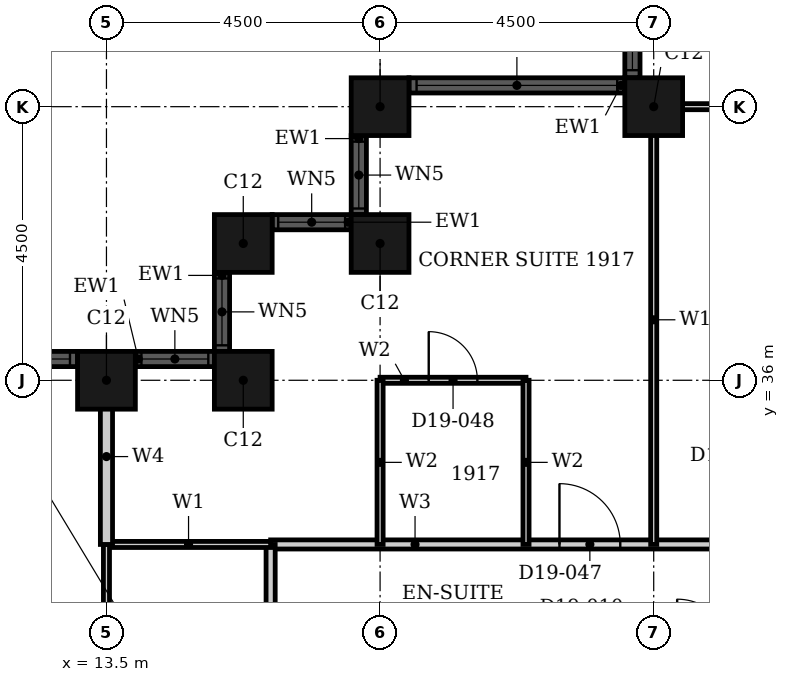
"""IFC4 building model, lengths in metres.
Left out: names, types, materials, properties, quantities, classifications, styles, units other than length and angle.
Written with IfcOpenShell. Run it as: python <this file> out.ifc"""

import sys

from ifc_helpers import new_model, si_unit, direction, frame, frame_2d, origin, origin_2d, place, context, subcontext, project, spatial, rectangle, hollow_rectangle, extrude, element, fill, save


model = new_model("IFC4")
c1 = context("Model", 3, precision=1e-05, world=origin(), true_north=direction((0.0, 1.0)))
c2 = subcontext(c1, "Body", "Model", "MODEL_VIEW")
j1 = project(units=[si_unit("LENGTHUNIT", "METRE"), si_unit("PLANEANGLEUNIT", "RADIAN")], contexts=[c1])
p1 = place(None, origin())
s1 = spatial("IfcSite", under=j1, at=p1, CompositionType="ELEMENT")
p2 = place(p1, origin())
s2 = spatial("IfcBuilding", under=s1, at=p2, CompositionType="ELEMENT")
p3 = place(p2, frame((0.0, 0.0, 81.6)))
s3 = spatial("IfcBuildingStorey", under=s2, at=p3, CompositionType="ELEMENT", Elevation=81.6)
for number, where, z_axis, x_axis in (
    (1, (22.5, 40.5, 0.0), (0.0, 0.0, 1.0), (1.0, 0.0, 0.0)),
    (2, (18.0, 40.5, 0.0), (0.0, 0.0, 1.0), (1.0, 0.0, 0.0)),
    (3, (18.0, 38.25, 0.0), (0.0, 0.0, 1.0), (1.0, 0.0, 0.0)),
    (4, (15.75, 38.25, 0.0), (0.0, 0.0, 1.0), (1.0, 0.0, 0.0)),
    (5, (15.75, 36.0, 0.0), (0.0, 0.0, 1.0), (1.0, 0.0, 0.0)),
    (6, (13.5, 36.0, 0.0), (0.0, 0.0, 1.0), (1.0, 0.0, 0.0)),
):
    element("IfcColumn", number, at=place(p3, frame(where, z_axis=z_axis, x_axis=x_axis)), inside=s3, PredefinedType="COLUMN", context=c2, shape_type="SweptSolid", body=[
        extrude(hollow_rectangle(XDim=0.95, YDim=0.95, WallThickness=0.03, at=origin_2d()), origin(), (0.0, 0.0, 1.0), 3.6),
    ])
p4 = place(p3, frame((22.15, 49.025, 0.0), z_axis=(0.0, 0.0, 1.0), x_axis=(0.0, -1.0, 0.0)))
e7 = element("IfcWall", 7, at=p4, inside=s3, PredefinedType="SOLIDWALL", context=c2, shape_type="SweptSolid", body=[
    extrude(rectangle(XDim=8.05, YDim=0.25, at=frame_2d((4.025, 0.0))), origin(), (0.0, 0.0, 1.0), 3.6),
])
p5 = place(p4, frame((0.125, 0.0, 0.9)))
e8 = element("IfcOpeningElement", 8, at=p5, cuts=e7, PredefinedType="OPENING", context=c2, shape_type="SweptSolid", body=[
    extrude(rectangle(XDim=3.3, YDim=2.08, at=frame_2d((1.65, 1.04))), frame((0.0, 0.135, 0.0), z_axis=(0.0, -1.0, 0.0), x_axis=(1.0, 0.0, 0.0)), (0.0, 0.0, 1.0), 0.27),
])
p6 = place(p4, frame((4.625, 0.0, 0.9)))
e9 = element("IfcOpeningElement", 9, at=p6, cuts=e7, PredefinedType="OPENING", context=c2, shape_type="SweptSolid", body=[
    extrude(rectangle(XDim=3.3, YDim=2.08, at=frame_2d((1.65, 1.04))), frame((0.0, 0.135, 0.0), z_axis=(0.0, -1.0, 0.0), x_axis=(1.0, 0.0, 0.0)), (0.0, 0.0, 1.0), 0.27),
])
p7 = place(p3, frame((22.025, 40.85, 0.0), z_axis=(0.0, 0.0, 1.0), x_axis=(-1.0, 0.0, 0.0)))
e10 = element("IfcWall", 10, at=p7, inside=s3, PredefinedType="SOLIDWALL", context=c2, shape_type="SweptSolid", body=[
    extrude(rectangle(XDim=3.55, YDim=0.25, at=frame_2d((1.775, 0.0))), origin(), (0.0, 0.0, 1.0), 3.6),
])
p8 = place(p7, frame((0.125, 0.0, 0.9)))
e11 = element("IfcOpeningElement", 11, at=p8, cuts=e10, PredefinedType="OPENING", context=c2, shape_type="SweptSolid", body=[
    extrude(rectangle(XDim=3.3, YDim=2.08, at=frame_2d((1.65, 1.04))), frame((0.0, 0.135, 0.0), z_axis=(0.0, -1.0, 0.0), x_axis=(1.0, 0.0, 0.0)), (0.0, 0.0, 1.0), 0.27),
])
p9 = place(p3, frame((17.65, 40.025, 0.0), z_axis=(0.0, 0.0, 1.0), x_axis=(0.0, -1.0, 0.0)))
e12 = element("IfcWall", 12, at=p9, inside=s3, PredefinedType="SOLIDWALL", context=c2, shape_type="SweptSolid", body=[
    extrude(rectangle(XDim=1.3, YDim=0.25, at=frame_2d((0.65, 0.0))), origin(), (0.0, 0.0, 1.0), 3.6),
])
p10 = place(p9, frame((0.1, 0.0, 0.9)))
e13 = element("IfcOpeningElement", 13, at=p10, cuts=e12, PredefinedType="OPENING", context=c2, shape_type="SweptSolid", body=[
    extrude(rectangle(XDim=1.1, YDim=2.08, at=frame_2d((0.55, 1.04))), frame((0.0, 0.135, 0.0), z_axis=(0.0, -1.0, 0.0), x_axis=(1.0, 0.0, 0.0)), (0.0, 0.0, 1.0), 0.27),
])
p11 = place(p3, frame((17.525, 38.6, 0.0), z_axis=(0.0, 0.0, 1.0), x_axis=(-1.0, 0.0, 0.0)))
e14 = element("IfcWall", 14, at=p11, inside=s3, PredefinedType="SOLIDWALL", context=c2, shape_type="SweptSolid", body=[
    extrude(rectangle(XDim=1.3, YDim=0.25, at=frame_2d((0.65, 0.0))), origin(), (0.0, 0.0, 1.0), 3.6),
])
p12 = place(p11, frame((0.1, 0.0, 0.9)))
e15 = element("IfcOpeningElement", 15, at=p12, cuts=e14, PredefinedType="OPENING", context=c2, shape_type="SweptSolid", body=[
    extrude(rectangle(XDim=1.1, YDim=2.08, at=frame_2d((0.55, 1.04))), frame((0.0, 0.135, 0.0), z_axis=(0.0, -1.0, 0.0), x_axis=(1.0, 0.0, 0.0)), (0.0, 0.0, 1.0), 0.27),
])
p13 = place(p3, frame((15.4, 37.775, 0.0), z_axis=(0.0, 0.0, 1.0), x_axis=(0.0, -1.0, 0.0)))
e16 = element("IfcWall", 16, at=p13, inside=s3, PredefinedType="SOLIDWALL", context=c2, shape_type="SweptSolid", body=[
    extrude(rectangle(XDim=1.3, YDim=0.25, at=frame_2d((0.65, 0.0))), origin(), (0.0, 0.0, 1.0), 3.6),
])
p14 = place(p13, frame((0.1, 0.0, 0.9)))
e17 = element("IfcOpeningElement", 17, at=p14, cuts=e16, PredefinedType="OPENING", context=c2, shape_type="SweptSolid", body=[
    extrude(rectangle(XDim=1.1, YDim=2.08, at=frame_2d((0.55, 1.04))), frame((0.0, 0.135, 0.0), z_axis=(0.0, -1.0, 0.0), x_axis=(1.0, 0.0, 0.0)), (0.0, 0.0, 1.0), 0.27),
])
p15 = place(p3, frame((15.275, 36.35, 0.0), z_axis=(0.0, 0.0, 1.0), x_axis=(-1.0, 0.0, 0.0)))
e18 = element("IfcWall", 18, at=p15, inside=s3, PredefinedType="SOLIDWALL", context=c2, shape_type="SweptSolid", body=[
    extrude(rectangle(XDim=1.3, YDim=0.25, at=frame_2d((0.65, 0.0))), origin(), (0.0, 0.0, 1.0), 3.6),
])
p16 = place(p15, frame((0.1, 0.0, 0.9)))
e19 = element("IfcOpeningElement", 19, at=p16, cuts=e18, PredefinedType="OPENING", context=c2, shape_type="SweptSolid", body=[
    extrude(rectangle(XDim=1.1, YDim=2.08, at=frame_2d((0.55, 1.04))), frame((0.0, 0.135, 0.0), z_axis=(0.0, -1.0, 0.0), x_axis=(1.0, 0.0, 0.0)), (0.0, 0.0, 1.0), 0.27),
])
p17 = place(p3, frame((13.025, 36.35, 0.0), z_axis=(0.0, 0.0, 1.0), x_axis=(-1.0, 0.0, 0.0)))
e20 = element("IfcWall", 20, at=p17, inside=s3, PredefinedType="SOLIDWALL", context=c2, shape_type="SweptSolid", body=[
    extrude(rectangle(XDim=8.05, YDim=0.25, at=frame_2d((4.025, 0.0))), origin(), (0.0, 0.0, 1.0), 3.6),
])
p18 = place(p17, frame((0.125, 0.0, 0.9)))
e21 = element("IfcOpeningElement", 21, at=p18, cuts=e20, PredefinedType="OPENING", context=c2, shape_type="SweptSolid", body=[
    extrude(rectangle(XDim=3.3, YDim=2.08, at=frame_2d((1.65, 1.04))), frame((0.0, 0.135, 0.0), z_axis=(0.0, -1.0, 0.0), x_axis=(1.0, 0.0, 0.0)), (0.0, 0.0, 1.0), 0.27),
])
p19 = place(p17, frame((4.625, 0.0, 0.9)))
e22 = element("IfcOpeningElement", 22, at=p19, cuts=e20, PredefinedType="OPENING", context=c2, shape_type="SweptSolid", body=[
    extrude(rectangle(XDim=3.3, YDim=2.08, at=frame_2d((1.65, 1.04))), frame((0.0, 0.135, 0.0), z_axis=(0.0, -1.0, 0.0), x_axis=(1.0, 0.0, 0.0)), (0.0, 0.0, 1.0), 0.27),
])
p20 = place(p3, frame((16.2, 33.3, 0.0), z_axis=(0.0, 0.0, 1.0), x_axis=(1.0, 0.0, 0.0)))
e23 = element("IfcWall", 23, at=p20, inside=s3, PredefinedType="PARTITIONING", context=c2, shape_type="SweptSolid", body=[
    extrude(rectangle(XDim=15.3, YDim=0.15, at=frame_2d((7.65, 0.0))), origin(), (0.0, 0.0, 1.0), 3.3),
])
p21 = place(p20, frame((4.75, 0.0, 0.0)))
e24 = element("IfcOpeningElement", 24, at=p21, cuts=e23, PredefinedType="OPENING", context=c2, shape_type="SweptSolid", body=[
    extrude(rectangle(XDim=1.0, YDim=2.1, at=frame_2d((0.5, 1.05))), frame((0.0, 0.085, 0.0), z_axis=(0.0, -1.0, 0.0), x_axis=(1.0, 0.0, 0.0)), (0.0, 0.0, 1.0), 0.17),
])
p22 = place(p20, frame((7.65, 0.0, 0.0)))
e25 = element("IfcOpeningElement", 25, at=p22, cuts=e23, PredefinedType="OPENING", context=c2, shape_type="SweptSolid", body=[
    extrude(rectangle(XDim=0.9, YDim=2.1, at=frame_2d((0.45, 1.05))), frame((0.0, 0.085, 0.0), z_axis=(0.0, -1.0, 0.0), x_axis=(1.0, 0.0, 0.0)), (0.0, 0.0, 1.0), 0.17),
])
p23 = place(p20, frame((12.15, 0.0, 0.0)))
e26 = element("IfcOpeningElement", 26, at=p23, cuts=e23, PredefinedType="OPENING", context=c2, shape_type="SweptSolid", body=[
    extrude(rectangle(XDim=0.9, YDim=2.1, at=frame_2d((0.45, 1.05))), frame((0.0, 0.085, 0.0), z_axis=(0.0, -1.0, 0.0), x_axis=(1.0, 0.0, 0.0)), (0.0, 0.0, 1.0), 0.17),
])
p24 = place(p3, frame((16.2, 27.0, 0.0), z_axis=(0.0, 0.0, 1.0), x_axis=(0.0, 1.0, 0.0)))
e27 = element("IfcWall", 27, at=p24, inside=s3, PredefinedType="PARTITIONING", context=c2, shape_type="SweptSolid", body=[
    extrude(rectangle(XDim=6.3, YDim=0.15, at=frame_2d((3.15, 0.0))), origin(), (0.0, 0.0, 1.0), 3.3),
])
p25 = place(p24, frame((2.55, 0.0, 0.0)))
e28 = element("IfcOpeningElement", 28, at=p25, cuts=e27, PredefinedType="OPENING", context=c2, shape_type="SweptSolid", body=[
    extrude(rectangle(XDim=0.9, YDim=2.1, at=frame_2d((0.45, 1.05))), frame((0.0, 0.085, 0.0), z_axis=(0.0, -1.0, 0.0), x_axis=(1.0, 0.0, 0.0)), (0.0, 0.0, 1.0), 0.17),
])
p26 = place(p3, frame((13.5, 33.3, 0.0), z_axis=(0.0, 0.0, 1.0), x_axis=(1.0, 0.0, 0.0)))
e29 = element("IfcWall", 29, at=p26, inside=s3, PredefinedType="PARTITIONING", context=c2, shape_type="SweptSolid", body=[
    extrude(rectangle(XDim=2.7, YDim=0.1, at=frame_2d((1.35, 0.0))), origin(), (0.0, 0.0, 1.0), 3.3),
])
p27 = place(p3, frame((22.31, 40.5, 0.0), z_axis=(0.0, 0.0, 1.0), x_axis=(1.0, 0.0, 0.0)))
e30 = element("IfcWall", 30, at=p27, inside=s3, PredefinedType="PARTITIONING", context=c2, shape_type="SweptSolid", body=[
    extrude(rectangle(XDim=9.19, YDim=0.1, at=frame_2d((4.595, 0.0))), origin(), (0.0, 0.0, 1.0), 2.38),
])
p28 = place(p3, frame((13.5, 27.0, 0.0), z_axis=(0.0, 0.0, 1.0), x_axis=(0.0, 1.0, 0.0)))
e31 = element("IfcWall", 31, at=p28, inside=s3, PredefinedType="PARTITIONING", context=c2, shape_type="SweptSolid", body=[
    extrude(rectangle(XDim=6.3, YDim=0.1, at=frame_2d((3.15, 0.0))), origin(), (0.0, 0.0, 1.0), 2.38),
])
p29 = place(p3, frame((22.5, 33.3, 0.0), z_axis=(0.0, 0.0, 1.0), x_axis=(0.0, 1.0, 0.0)))
e32 = element("IfcWall", 32, at=p29, inside=s3, PredefinedType="PARTITIONING", context=c2, shape_type="SweptSolid", body=[
    extrude(rectangle(XDim=7.39, YDim=0.1, at=frame_2d((3.695, 0.0))), origin(), (0.0, 0.0, 1.0), 3.3),
])
p30 = place(p3, frame((13.5, 33.3, 0.0), z_axis=(0.0, 0.0, 1.0), x_axis=(0.0, 1.0, 0.0)))
e33 = element("IfcWall", 33, at=p30, inside=s3, PredefinedType="PARTITIONING", context=c2, shape_type="SweptSolid", body=[
    extrude(rectangle(XDim=2.89, YDim=0.2, at=frame_2d((1.445, 0.0))), origin(), (0.0, 0.0, 1.0), 2.38),
])
p31 = place(p3, frame((18.0, 36.0, 0.0), z_axis=(0.0, 0.0, 1.0), x_axis=(1.0, 0.0, 0.0)))
e34 = element("IfcWall", 34, at=p31, inside=s3, PredefinedType="PARTITIONING", context=c2, shape_type="SweptSolid", body=[
    extrude(rectangle(XDim=2.4, YDim=0.1, at=frame_2d((1.2, 0.0))), origin(), (0.0, 0.0, 1.0), 3.3),
])
p32 = place(p31, frame((0.8, 0.0, 0.0)))
e35 = element("IfcOpeningElement", 35, at=p32, cuts=e34, PredefinedType="OPENING", context=c2, shape_type="SweptSolid", body=[
    extrude(rectangle(XDim=0.8, YDim=2.1, at=frame_2d((0.4, 1.05))), frame((0.0, 0.06, 0.0), z_axis=(0.0, -1.0, 0.0), x_axis=(1.0, 0.0, 0.0)), (0.0, 0.0, 1.0), 0.12),
])
for number, where, z_axis, x_axis in (
    (36, (18.0, 33.3, 0.0), (0.0, 0.0, 1.0), (0.0, 1.0, 0.0)),
    (37, (20.4, 33.3, 0.0), (0.0, 0.0, 1.0), (0.0, 1.0, 0.0)),
):
    element("IfcWall", number, at=place(p3, frame(where, z_axis=z_axis, x_axis=x_axis)), inside=s3, PredefinedType="PARTITIONING", context=c2, shape_type="SweptSolid", body=[
        extrude(rectangle(XDim=2.7, YDim=0.1, at=frame_2d((1.35, 0.0))), origin(), (0.0, 0.0, 1.0), 3.3),
    ])
p33 = place(p6, origin())
e38 = element("IfcWindow", 38, at=p33, inside=s3, PartitioningType="SINGLE_PANEL", PredefinedType="WINDOW", context=c2, shape_type="SweptSolid", body=[
    extrude(rectangle(XDim=3.3, YDim=2.08, at=frame_2d((1.65, 1.04))), frame((0.0, 0.03, 0.0), z_axis=(0.0, -1.0, 0.0), x_axis=(1.0, 0.0, 0.0)), (0.0, 0.0, 1.0), 0.06),
])
fill(e9, e38)
p34 = place(p8, origin())
e39 = element("IfcWindow", 39, at=p34, inside=s3, PartitioningType="SINGLE_PANEL", PredefinedType="WINDOW", context=c2, shape_type="SweptSolid", body=[
    extrude(rectangle(XDim=3.3, YDim=2.08, at=frame_2d((1.65, 1.04))), frame((0.0, 0.03, 0.0), z_axis=(0.0, -1.0, 0.0), x_axis=(1.0, 0.0, 0.0)), (0.0, 0.0, 1.0), 0.06),
])
fill(e11, e39)
p35 = place(p10, origin())
e40 = element("IfcWindow", 40, at=p35, inside=s3, PartitioningType="SINGLE_PANEL", PredefinedType="WINDOW", context=c2, shape_type="SweptSolid", body=[
    extrude(rectangle(XDim=1.1, YDim=2.08, at=frame_2d((0.55, 1.04))), frame((0.0, 0.03, 0.0), z_axis=(0.0, -1.0, 0.0), x_axis=(1.0, 0.0, 0.0)), (0.0, 0.0, 1.0), 0.06),
])
fill(e13, e40)
p36 = place(p12, origin())
e41 = element("IfcWindow", 41, at=p36, inside=s3, PartitioningType="SINGLE_PANEL", PredefinedType="WINDOW", context=c2, shape_type="SweptSolid", body=[
    extrude(rectangle(XDim=1.1, YDim=2.08, at=frame_2d((0.55, 1.04))), frame((0.0, 0.03, 0.0), z_axis=(0.0, -1.0, 0.0), x_axis=(1.0, 0.0, 0.0)), (0.0, 0.0, 1.0), 0.06),
])
fill(e15, e41)
p37 = place(p14, origin())
e42 = element("IfcWindow", 42, at=p37, inside=s3, PartitioningType="SINGLE_PANEL", PredefinedType="WINDOW", context=c2, shape_type="SweptSolid", body=[
    extrude(rectangle(XDim=1.1, YDim=2.08, at=frame_2d((0.55, 1.04))), frame((0.0, 0.03, 0.0), z_axis=(0.0, -1.0, 0.0), x_axis=(1.0, 0.0, 0.0)), (0.0, 0.0, 1.0), 0.06),
])
fill(e17, e42)
p38 = place(p16, origin())
e43 = element("IfcWindow", 43, at=p38, inside=s3, PartitioningType="SINGLE_PANEL", PredefinedType="WINDOW", context=c2, shape_type="SweptSolid", body=[
    extrude(rectangle(XDim=1.1, YDim=2.08, at=frame_2d((0.55, 1.04))), frame((0.0, 0.03, 0.0), z_axis=(0.0, -1.0, 0.0), x_axis=(1.0, 0.0, 0.0)), (0.0, 0.0, 1.0), 0.06),
])
fill(e19, e43)
p39 = place(p18, origin())
e44 = element("IfcWindow", 44, at=p39, inside=s3, PartitioningType="SINGLE_PANEL", PredefinedType="WINDOW", context=c2, shape_type="SweptSolid", body=[
    extrude(rectangle(XDim=3.3, YDim=2.08, at=frame_2d((1.65, 1.04))), frame((0.0, 0.03, 0.0), z_axis=(0.0, -1.0, 0.0), x_axis=(1.0, 0.0, 0.0)), (0.0, 0.0, 1.0), 0.06),
])
fill(e21, e44)
p40 = place(p21, origin())
e45 = element("IfcDoor", 45, at=p40, inside=s3, OperationType="SINGLE_SWING_RIGHT", PredefinedType="DOOR", context=c2, shape_type="SweptSolid", body=[
    extrude(rectangle(XDim=1.0, YDim=2.1, at=frame_2d((0.5, 1.05))), frame((0.0, 0.025, 0.0), z_axis=(0.0, -1.0, 0.0), x_axis=(1.0, 0.0, 0.0)), (0.0, 0.0, 1.0), 0.05),
])
fill(e24, e45)
p41 = place(p32, origin())
e46 = element("IfcDoor", 46, at=p41, inside=s3, OperationType="SINGLE_SWING_LEFT", PredefinedType="DOOR", context=c2, shape_type="SweptSolid", body=[
    extrude(rectangle(XDim=0.8, YDim=2.1, at=frame_2d((0.4, 1.05))), frame((0.0, 0.025, 0.0), z_axis=(0.0, -1.0, 0.0), x_axis=(1.0, 0.0, 0.0)), (0.0, 0.0, 1.0), 0.05),
])
fill(e35, e46)
save(model, sys.argv[1])
